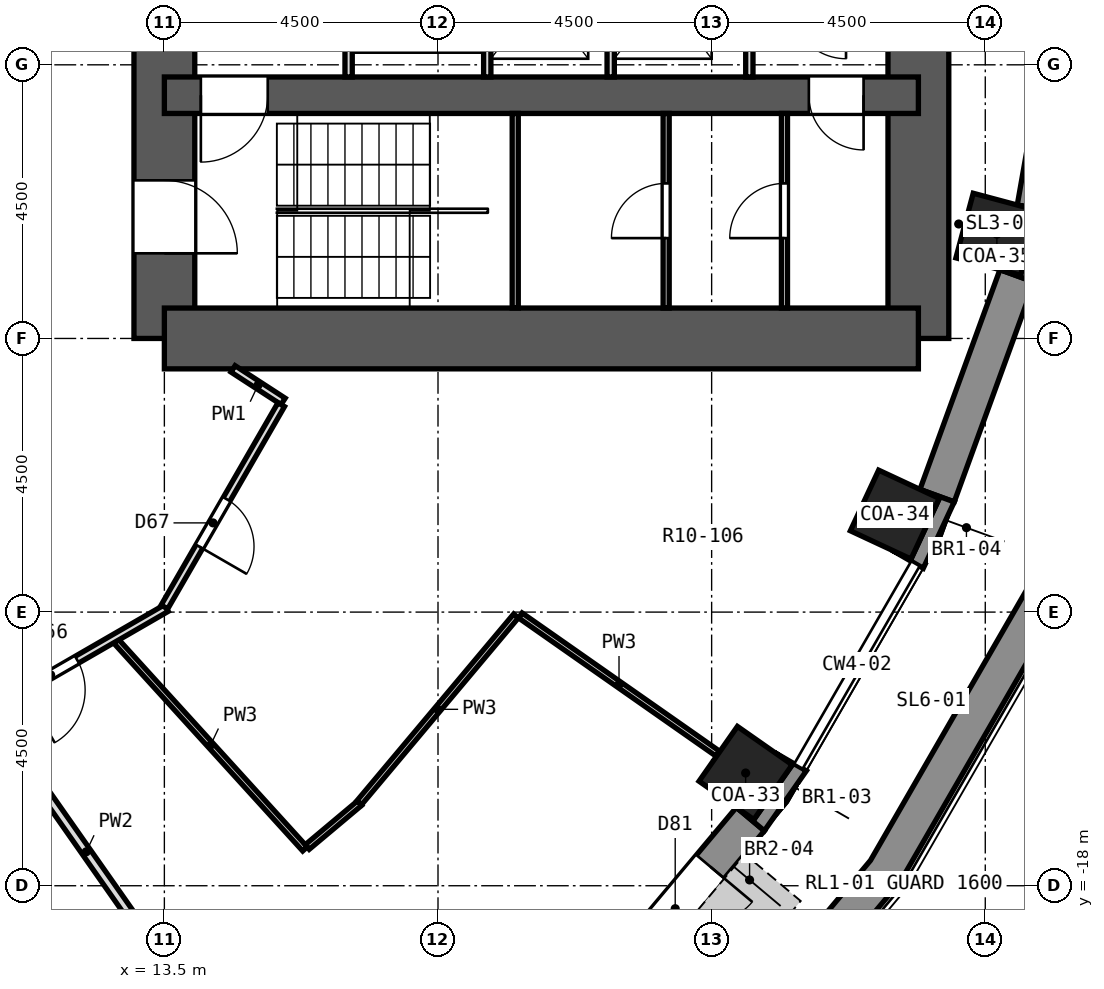
"""IFC4 building model, lengths in metres.
Left out: names, types, materials, properties, quantities, classifications, styles, units other than length and angle.
Written with IfcOpenShell. Run it as: python <this file> out.ifc"""

import sys

from ifc_helpers import new_model, si_unit, direction, frame, frame_2d, origin, origin_2d, place, context, subcontext, project, spatial, polyline, rectangle, outline, extrude, element, fill, save


model = new_model("IFC4")
c1 = context("Model", 3, precision=1e-05, world=origin(), true_north=direction((0.0, 1.0)))
c2 = subcontext(c1, "Body", "Model", "MODEL_VIEW")
j1 = project(units=[si_unit("LENGTHUNIT", "METRE"), si_unit("PLANEANGLEUNIT", "RADIAN")], contexts=[c1])
p1 = place(None, origin())
s1 = spatial("IfcSite", under=j1, at=p1, CompositionType="ELEMENT")
p2 = place(p1, origin())
s2 = spatial("IfcBuilding", under=s1, at=p2, CompositionType="ELEMENT")
p3 = place(p2, frame((0.0, 0.0, 36.2)))
s3 = spatial("IfcBuildingStorey", under=s2, at=p3, CompositionType="ELEMENT", Elevation=36.2)
for number, where, z_axis, x_axis in (
    (1, (23.059, -16.146, 0.0), (0.0, 0.0, 1.0), (0.819, -0.574, 0.0)),
    (2, (25.512, -11.897, 0.0), (0.0, 0.0, 1.0), (0.906, -0.423, 0.0)),
    (3, (27.191, -7.286, 0.0), (0.0, 0.0, 1.0), (0.966, -0.259, 0.0)),
):
    element("IfcColumn", number, at=place(p3, frame(where, z_axis=z_axis, x_axis=x_axis)), inside=s3, PredefinedType="COLUMN", context=c2, shape_type="SweptSolid", body=[
        extrude(rectangle(XDim=1.1, YDim=1.1, at=origin_2d()), origin(), (0.0, 0.0, 1.0), 3.3),
    ])
p4 = place(p3, frame((13.5, -9.0, 0.0), z_axis=(0.0, 0.0, 1.0), x_axis=(0.0, 1.0, 0.0)))
e4 = element("IfcWall", 4, at=p4, inside=s3, PredefinedType="SHEAR", context=c2, shape_type="SweptSolid", body=[
    extrude(rectangle(XDim=18.0, YDim=1.0, at=frame_2d((9.0, 0.0))), origin(), (0.0, 0.0, 1.0), 3.3),
])
p5 = place(p4, frame((15.4, 0.0, 0.0)))
e5 = element("IfcOpeningElement", 5, at=p5, cuts=e4, PredefinedType="OPENING", context=c2, shape_type="SweptSolid", body=[
    extrude(rectangle(XDim=1.2, YDim=2.1, at=frame_2d((0.6, 1.05))), frame((0.0, 0.512, 0.0), z_axis=(0.0, -1.0, 0.0), x_axis=(1.0, 0.0, 0.0)), (0.0, 0.0, 1.0), 1.024),
])
p6 = place(p4, frame((1.4, 0.0, 0.0)))
e6 = element("IfcOpeningElement", 6, at=p6, cuts=e4, PredefinedType="OPENING", context=c2, shape_type="SweptSolid", body=[
    extrude(rectangle(XDim=1.2, YDim=2.1, at=frame_2d((0.6, 1.05))), frame((0.0, 0.512, 0.0), z_axis=(0.0, -1.0, 0.0), x_axis=(1.0, 0.0, 0.0)), (0.0, 0.0, 1.0), 1.024),
])
p7 = place(p4, frame((7.5, 0.0, 0.0)))
e7 = element("IfcOpeningElement", 7, at=p7, cuts=e4, PredefinedType="OPENING", context=c2, shape_type="SweptSolid", body=[
    extrude(rectangle(XDim=3.0, YDim=2.4, at=frame_2d((1.5, 1.2))), frame((0.0, 0.512, 0.0), z_axis=(0.0, -1.0, 0.0), x_axis=(1.0, 0.0, 0.0)), (0.0, 0.0, 1.0), 1.024),
])
p8 = place(p3, frame((25.9, -9.0, 0.0), z_axis=(0.0, 0.0, 1.0), x_axis=(0.0, 1.0, 0.0)))
e8 = element("IfcWall", 8, at=p8, inside=s3, PredefinedType="SHEAR", context=c2, shape_type="SweptSolid", body=[
    extrude(rectangle(XDim=18.0, YDim=1.0, at=frame_2d((9.0, 0.0))), origin(), (0.0, 0.0, 1.0), 3.3),
])
p9 = place(p3, frame((13.5, -9.0, 0.0), z_axis=(0.0, 0.0, 1.0), x_axis=(1.0, 0.0, 0.0)))
e9 = element("IfcWall", 9, at=p9, inside=s3, PredefinedType="SHEAR", context=c2, shape_type="SweptSolid", body=[
    extrude(rectangle(XDim=12.4, YDim=1.0, at=frame_2d((6.2, 0.0))), origin(), (0.0, 0.0, 1.0), 3.3),
])
p10 = place(p3, frame((13.5, -5.0, 0.0), z_axis=(0.0, 0.0, 1.0), x_axis=(1.0, 0.0, 0.0)))
e10 = element("IfcWall", 10, at=p10, inside=s3, PredefinedType="SHEAR", context=c2, shape_type="SweptSolid", body=[
    extrude(rectangle(XDim=12.4, YDim=0.6, at=frame_2d((6.2, 0.0))), origin(), (0.0, 0.0, 1.0), 3.3),
])
p11 = place(p10, frame((10.599, 0.0, 0.0)))
e11 = element("IfcOpeningElement", 11, at=p11, cuts=e10, PredefinedType="OPENING", context=c2, shape_type="SweptSolid", body=[
    extrude(rectangle(XDim=0.9, YDim=2.1, at=frame_2d((0.45, 1.05))), frame((0.0, 0.312, 0.0), z_axis=(0.0, -1.0, 0.0), x_axis=(1.0, 0.0, 0.0)), (0.0, 0.0, 1.0), 0.624),
])
p12 = place(p10, frame((0.6, 0.0, 0.0)))
e12 = element("IfcOpeningElement", 12, at=p12, cuts=e10, PredefinedType="OPENING", context=c2, shape_type="SweptSolid", body=[
    extrude(rectangle(XDim=1.1, YDim=2.1, at=frame_2d((0.55, 1.05))), frame((0.0, 0.312, 0.0), z_axis=(0.0, -1.0, 0.0), x_axis=(1.0, 0.0, 0.0)), (0.0, 0.0, 1.0), 0.624),
])
p13 = place(p3, frame((20.665, -19.85, 0.0), z_axis=(0.0, 0.0, 1.0), x_axis=(0.642809392687, 0.766026164483, 0.0)))
e13 = element("IfcWall", 13, at=p13, inside=s3, PredefinedType="SOLIDWALL", context=c2, shape_type="SweptSolid", body=[
    extrude(rectangle(XDim=3.846, YDim=0.6, at=frame_2d((1.923, 0.0))), origin(), (0.0, 0.0, 1.0), 2.75),
])
p14 = place(p13, frame((1.023, 0.0, 0.0)))
e14 = element("IfcOpeningElement", 14, at=p14, cuts=e13, PredefinedType="OPENING", context=c2, shape_type="SweptSolid", body=[
    extrude(rectangle(XDim=1.8, YDim=2.4, at=frame_2d((0.9, 1.2))), frame((0.0, 0.312, 0.0), z_axis=(0.0, -1.0, 0.0), x_axis=(1.0, 0.0, 0.0)), (0.0, 0.0, 1.0), 0.624),
])
p15 = place(p3, frame((26.208, -11.585, 0.0), z_axis=(0.0, 0.0, 1.0), x_axis=(0.342028474173, 0.939689588564, 0.0)))
e15 = element("IfcWall", 15, at=p15, inside=s3, PredefinedType="SOLIDWALL", context=c2, shape_type="SweptSolid", body=[
    extrude(rectangle(XDim=3.846, YDim=0.6, at=frame_2d((1.923, 0.0))), origin(), (0.0, 0.0, 1.0), 2.75),
])
p16 = place(p3, frame((27.821, -6.858, 0.0), z_axis=(0.0, 0.0, 1.0), x_axis=(0.173687553279, 0.984800809218, 0.0)))
e16 = element("IfcWall", 16, at=p16, inside=s3, PredefinedType="SOLIDWALL", context=c2, shape_type="SweptSolid", body=[
    extrude(rectangle(XDim=3.846, YDim=0.6, at=frame_2d((1.923, 0.0))), origin(), (0.0, 0.0, 1.0), 2.75),
])
p17 = place(p3, origin())
e17 = element("IfcWall", 17, at=p17, inside=s3, PredefinedType="SOLIDWALL", context=c2, shape_type="SweptSolid", body=[
    extrude(outline(polyline([(23.367, -17.097), (24.058, -16.11), (23.538, -15.81), (23.825, -16.011), (23.194, -16.912), (22.907, -16.711), (23.367, -17.097)])), origin(), (0.0, 0.0, 1.0), 2.75),
])
p18 = place(p3, origin())
e18 = element("IfcWall", 18, at=p18, inside=s3, PredefinedType="SOLIDWALL", context=c2, shape_type="SweptSolid", body=[
    extrude(outline(polyline([(26.49, -11.688), (25.926, -11.483), (26.243, -11.631), (25.779, -12.628), (25.461, -12.479), (25.981, -12.78), (26.49, -11.688)])), origin(), (0.0, 0.0, 1.0), 2.75),
])
p19 = place(p3, origin())
e19 = element("IfcWall", 19, at=p19, inside=s3, PredefinedType="SOLIDWALL", context=c2, shape_type="SweptSolid", body=[
    extrude(outline(polyline([(28.117, -6.91), (27.526, -6.806), (27.865, -6.897), (27.58, -7.959), (27.241, -7.869), (27.805, -8.074), (28.117, -6.91)])), origin(), (0.0, 0.0, 1.0), 2.75),
])
p20 = place(p3, origin())
e20 = element("IfcWall", 20, at=p20, inside=s3, PredefinedType="PARAPET", context=c2, shape_type="SweptSolid", body=[
    extrude(outline(polyline([(22.103, -22.103), (25.605, -17.929), (28.33, -13.21), (27.784, -12.956), (25.112, -17.584), (21.677, -21.677), (22.103, -22.103)])), origin(), (0.0, 0.0, 1.0), 0.5),
])
p21 = place(p3, frame((10.63, -15.181, 0.0), z_axis=(0.0, 0.0, 1.0), x_axis=(0.573951755358, -0.818889114912, 0.0)))
e21 = element("IfcWall", 21, at=p21, inside=s3, PredefinedType="PARTITIONING", context=c2, shape_type="SweptSolid", body=[
    extrude(rectangle(XDim=5.523, YDim=0.15, at=frame_2d((2.761, 0.0))), origin(), (0.0, 0.0, 1.0), 2.75),
])
p22 = place(p3, frame((12.708, -13.98, 0.0), z_axis=(0.0, 0.0, 1.0), x_axis=(0.672630660637, -0.739978374259, 0.0)))
e22 = element("IfcWall", 22, at=p22, inside=s3, PredefinedType="PARTITIONING", context=c2, shape_type="SweptSolid", body=[
    extrude(rectangle(XDim=4.615, YDim=0.1, at=frame_2d((2.307, 0.0))), origin(), (0.0, 0.0, 1.0), 2.75),
])
p23 = place(p3, frame((19.355, -13.555, 0.0), z_axis=(0.0, 0.0, 1.0), x_axis=(0.819211647212, -0.573491305141, 0.0)))
e23 = element("IfcWall", 23, at=p23, inside=s3, PredefinedType="PARTITIONING", context=c2, shape_type="SweptSolid", body=[
    extrude(rectangle(XDim=3.96, YDim=0.1, at=frame_2d((1.98, 0.0))), origin(), (0.0, 0.0, 1.0), 2.75),
])
p24 = place(p3, frame((14.629, -9.5, 0.0), z_axis=(0.0, 0.0, 1.0), x_axis=(0.838755766808, -0.544507817801, 0.0)))
e24 = element("IfcWall", 24, at=p24, inside=s3, PredefinedType="PARTITIONING", context=c2, shape_type="SweptSolid", body=[
    extrude(rectangle(XDim=0.982, YDim=0.125, at=frame_2d((0.491, 0.0))), origin(), (0.0, 0.0, 1.0), 2.75),
])
p25 = place(p3, frame((4.984, -18.369, 0.0), z_axis=(0.0, 0.0, 1.0), x_axis=(0.86605048973, 0.49995654735, 0.0)))
e25 = element("IfcWall", 25, at=p25, inside=s3, PredefinedType="PARTITIONING", context=c2, shape_type="SweptSolid", body=[
    extrude(rectangle(XDim=9.871, YDim=0.125, at=frame_2d((4.935, 0.0))), origin(), (0.0, 0.0, 1.0), 2.75),
])
p26 = place(p25, frame((7.174, 0.0, 0.0)))
e26 = element("IfcOpeningElement", 26, at=p26, cuts=e25, PredefinedType="OPENING", context=c2, shape_type="SweptSolid", body=[
    extrude(rectangle(XDim=1.0, YDim=2.1, at=frame_2d((0.5, 1.05))), frame((0.0, 0.074, 0.0), z_axis=(0.0, -1.0, 0.0), x_axis=(1.0, 0.0, 0.0)), (0.0, 0.0, 1.0), 0.149),
])
p27 = place(p3, frame((15.85, -17.363, 0.0), z_axis=(0.0, 0.0, 1.0), x_axis=(0.766277754486, 0.642509457502, 0.0)))
e27 = element("IfcWall", 27, at=p27, inside=s3, PredefinedType="PARTITIONING", context=c2, shape_type="SweptSolid", body=[
    extrude(rectangle(XDim=1.124, YDim=0.1, at=frame_2d((0.562, 0.0))), origin(), (0.0, 0.0, 1.0), 2.75),
])
p28 = place(p3, frame((16.705, -16.635, 0.0), z_axis=(0.0, 0.0, 1.0), x_axis=(0.642869335103, 0.765975859923, 0.0)))
e28 = element("IfcWall", 28, at=p28, inside=s3, PredefinedType="PARTITIONING", context=c2, shape_type="SweptSolid", body=[
    extrude(rectangle(XDim=4.01, YDim=0.1, at=frame_2d((2.005, 0.0))), origin(), (0.0, 0.0, 1.0), 2.75),
])
p29 = place(p3, frame((13.501, -13.416, 0.0), z_axis=(0.0, 0.0, 1.0), x_axis=(0.499953532967, 0.866052229876, 0.0)))
e29 = element("IfcWall", 29, at=p29, inside=s3, PredefinedType="PARTITIONING", context=c2, shape_type="SweptSolid", body=[
    extrude(rectangle(XDim=3.841, YDim=0.125, at=frame_2d((1.92, 0.0))), origin(), (0.0, 0.0, 1.0), 2.75),
])
p30 = place(p29, frame((1.147, 0.0, 0.0)))
e30 = element("IfcOpeningElement", 30, at=p30, cuts=e29, PredefinedType="OPENING", context=c2, shape_type="SweptSolid", body=[
    extrude(rectangle(XDim=0.9, YDim=2.1, at=frame_2d((0.45, 1.05))), frame((0.0, 0.074, 0.0), z_axis=(0.0, -1.0, 0.0), x_axis=(1.0, 0.0, 0.0)), (0.0, 0.0, 1.0), 0.149),
])
p31 = place(p3, frame((16.53, -4.7, 0.0), z_axis=(0.0, 0.0, 1.0), x_axis=(0.0, 1.0, 0.0)))
e31 = element("IfcWall", 31, at=p31, inside=s3, PredefinedType="PARTITIONING", context=c2, shape_type="SweptSolid", body=[
    extrude(rectangle(XDim=2.4, YDim=0.12, at=frame_2d((1.2, 0.0))), origin(), (0.0, 0.0, 1.0), 2.75),
])
p32 = place(p31, frame((0.65, 0.0, 0.0)))
e32 = element("IfcOpeningElement", 32, at=p32, cuts=e31, PredefinedType="OPENING", context=c2, shape_type="SweptSolid", body=[
    extrude(rectangle(XDim=1.1, YDim=2.1, at=frame_2d((0.55, 1.05))), frame((0.0, 0.072, 0.0), z_axis=(0.0, -1.0, 0.0), x_axis=(1.0, 0.0, 0.0)), (0.0, 0.0, 1.0), 0.144),
])
for number, where, z_axis, x_axis in (
    (33, (18.81, -4.7, 0.0), (0.0, 0.0, 1.0), (0.0, 1.0, 0.0)),
    (34, (20.84, -4.7, 0.0), (0.0, 0.0, 1.0), (0.0, 1.0, 0.0)),
    (35, (23.12, -4.7, 0.0), (0.0, 0.0, 1.0), (0.0, 1.0, 0.0)),
):
    element("IfcWall", number, at=place(p3, frame(where, z_axis=z_axis, x_axis=x_axis)), inside=s3, PredefinedType="PARTITIONING", context=c2, shape_type="SweptSolid", body=[
        extrude(rectangle(XDim=2.4, YDim=0.12, at=frame_2d((1.2, 0.0))), origin(), (0.0, 0.0, 1.0), 2.75),
    ])
p33 = place(p3, frame((19.27, -8.5, 0.0), z_axis=(0.0, 0.0, 1.0), x_axis=(0.0, 1.0, 0.0)))
e36 = element("IfcWall", 36, at=p33, inside=s3, PredefinedType="PARTITIONING", context=c2, shape_type="SweptSolid", body=[
    extrude(rectangle(XDim=3.2, YDim=0.1, at=frame_2d((1.6, 0.0))), origin(), (0.0, 0.0, 1.0), 2.75),
])
p34 = place(p3, frame((21.752, -8.5, 0.0), z_axis=(0.0, 0.0, 1.0), x_axis=(0.0, 1.0, 0.0)))
e37 = element("IfcWall", 37, at=p34, inside=s3, PredefinedType="PARTITIONING", context=c2, shape_type="SweptSolid", body=[
    extrude(rectangle(XDim=3.2, YDim=0.1, at=frame_2d((1.6, 0.0))), origin(), (0.0, 0.0, 1.0), 2.75),
])
p35 = place(p34, frame((1.15, 0.0, 0.0)))
e38 = element("IfcOpeningElement", 38, at=p35, cuts=e37, PredefinedType="OPENING", context=c2, shape_type="SweptSolid", body=[
    extrude(rectangle(XDim=0.9, YDim=2.1, at=frame_2d((0.45, 1.05))), frame((0.0, 0.062, 0.0), z_axis=(0.0, -1.0, 0.0), x_axis=(1.0, 0.0, 0.0)), (0.0, 0.0, 1.0), 0.124),
])
p36 = place(p3, frame((23.698, -8.5, 0.0), z_axis=(0.0, 0.0, 1.0), x_axis=(0.0, 1.0, 0.0)))
e39 = element("IfcWall", 39, at=p36, inside=s3, PredefinedType="PARTITIONING", context=c2, shape_type="SweptSolid", body=[
    extrude(rectangle(XDim=3.2, YDim=0.1, at=frame_2d((1.6, 0.0))), origin(), (0.0, 0.0, 1.0), 2.75),
])
p37 = place(p36, frame((1.15, 0.0, 0.0)))
e40 = element("IfcOpeningElement", 40, at=p37, cuts=e39, PredefinedType="OPENING", context=c2, shape_type="SweptSolid", body=[
    extrude(rectangle(XDim=0.9, YDim=2.1, at=frame_2d((0.45, 1.05))), frame((0.0, 0.062, 0.0), z_axis=(0.0, -1.0, 0.0), x_axis=(1.0, 0.0, 0.0)), (0.0, 0.0, 1.0), 0.124),
])
p38 = place(p14, frame((1.8, 0.0, 0.0), z_axis=(0.0, 0.0, 1.0), x_axis=(-1.0, 0.0, 0.0)))
e41 = element("IfcDoor", 41, at=p38, inside=s3, OperationType="DOUBLE_DOOR_SINGLE_SWING", PredefinedType="DOOR", context=c2, shape_type="SweptSolid", body=[
    extrude(rectangle(XDim=1.8, YDim=2.4, at=frame_2d((0.9, 1.2))), frame((0.0, -0.075, 0.0), z_axis=(0.0, -1.0, 0.0), x_axis=(1.0, 0.0, 0.0)), (0.0, 0.0, 1.0), 0.05),
])
fill(e14, e41)
p39 = place(p26, frame((1.0, 0.0, 0.0), z_axis=(0.0, 0.0, 1.0), x_axis=(-1.0, 0.0, 0.0)))
e42 = element("IfcDoor", 42, at=p39, inside=s3, OperationType="SINGLE_SWING_RIGHT", PredefinedType="DOOR", context=c2, shape_type="SweptSolid", body=[
    extrude(rectangle(XDim=1.0, YDim=2.1, at=frame_2d((0.5, 1.05))), frame((0.0, 0.025, 0.0), z_axis=(0.0, -1.0, 0.0), x_axis=(1.0, 0.0, 0.0)), (0.0, 0.0, 1.0), 0.05),
])
fill(e26, e42)
p40 = place(p30, frame((0.9, 0.0, 0.0), z_axis=(0.0, 0.0, 1.0), x_axis=(-1.0, 0.0, 0.0)))
e43 = element("IfcDoor", 43, at=p40, inside=s3, OperationType="SINGLE_SWING_RIGHT", PredefinedType="DOOR", context=c2, shape_type="SweptSolid", body=[
    extrude(rectangle(XDim=0.9, YDim=2.1, at=frame_2d((0.45, 1.05))), frame((0.0, 0.025, 0.0), z_axis=(0.0, -1.0, 0.0), x_axis=(1.0, 0.0, 0.0)), (0.0, 0.0, 1.0), 0.05),
])
fill(e30, e43)
p41 = place(p37, origin())
e44 = element("IfcDoor", 44, at=p41, inside=s3, OperationType="SINGLE_SWING_LEFT", PredefinedType="DOOR", context=c2, shape_type="SweptSolid", body=[
    extrude(rectangle(XDim=0.9, YDim=2.1, at=frame_2d((0.45, 1.05))), frame((0.0, 0.025, 0.0), z_axis=(0.0, -1.0, 0.0), x_axis=(1.0, 0.0, 0.0)), (0.0, 0.0, 1.0), 0.05),
])
fill(e40, e44)
p42 = place(p35, origin())
e45 = element("IfcDoor", 45, at=p42, inside=s3, OperationType="SINGLE_SWING_LEFT", PredefinedType="DOOR", context=c2, shape_type="SweptSolid", body=[
    extrude(rectangle(XDim=0.9, YDim=2.1, at=frame_2d((0.45, 1.05))), frame((0.0, 0.025, 0.0), z_axis=(0.0, -1.0, 0.0), x_axis=(1.0, 0.0, 0.0)), (0.0, 0.0, 1.0), 0.05),
])
fill(e38, e45)
p43 = place(p11, frame((0.9, 0.0, 0.0), z_axis=(0.0, 0.0, 1.0), x_axis=(-1.0, 0.0, 0.0)))
e46 = element("IfcDoor", 46, at=p43, inside=s3, OperationType="SINGLE_SWING_LEFT", PredefinedType="DOOR", context=c2, shape_type="SweptSolid", body=[
    extrude(rectangle(XDim=0.9, YDim=2.1, at=frame_2d((0.45, 1.05))), frame((0.0, 0.025, 0.0), z_axis=(0.0, -1.0, 0.0), x_axis=(1.0, 0.0, 0.0)), (0.0, 0.0, 1.0), 0.05),
])
fill(e11, e46)
p44 = place(p12, frame((1.1, 0.0, 0.0), z_axis=(0.0, 0.0, 1.0), x_axis=(-1.0, 0.0, 0.0)))
e47 = element("IfcDoor", 47, at=p44, inside=s3, OperationType="SINGLE_SWING_RIGHT", PredefinedType="DOOR", context=c2, shape_type="SweptSolid", body=[
    extrude(rectangle(XDim=1.1, YDim=2.1, at=frame_2d((0.55, 1.05))), frame((0.0, 0.025, 0.0), z_axis=(0.0, -1.0, 0.0), x_axis=(1.0, 0.0, 0.0)), (0.0, 0.0, 1.0), 0.05),
])
fill(e12, e47)
p45 = place(p6, frame((1.2, 0.0, 0.0), z_axis=(0.0, 0.0, 1.0), x_axis=(-1.0, 0.0, 0.0)))
e48 = element("IfcDoor", 48, at=p45, inside=s3, OperationType="SINGLE_SWING_RIGHT", PredefinedType="DOOR", context=c2, shape_type="SweptSolid", body=[
    extrude(rectangle(XDim=1.2, YDim=2.1, at=frame_2d((0.6, 1.05))), frame((0.0, 0.025, 0.0), z_axis=(0.0, -1.0, 0.0), x_axis=(1.0, 0.0, 0.0)), (0.0, 0.0, 1.0), 0.05),
])
fill(e6, e48)
save(model, sys.argv[1])
